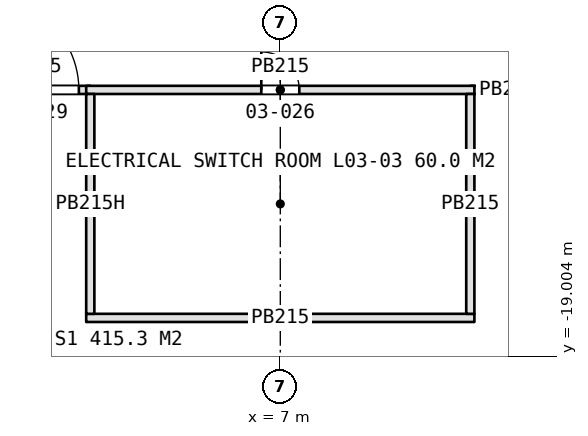
"""IFC4 building model, lengths in metres.
Left out: names, types, materials, properties, quantities, classifications, styles, units other than length and angle.
Written with IfcOpenShell. Run it as: python <this file> out.ifc"""

import sys

from ifc_helpers import new_model, si_unit, direction, frame, frame_2d, origin, place, context, subcontext, project, spatial, rectangle, extrude, element, fill, save


model = new_model("IFC4")
c1 = context("Model", 3, precision=1e-05, world=origin(), true_north=direction((0.0, 1.0)))
c2 = subcontext(c1, "Body", "Model", "MODEL_VIEW")
j1 = project(units=[si_unit("LENGTHUNIT", "METRE"), si_unit("PLANEANGLEUNIT", "RADIAN")], contexts=[c1])
p1 = place(None, origin())
s1 = spatial("IfcSite", under=j1, at=p1, CompositionType="ELEMENT")
p2 = place(p1, origin())
s2 = spatial("IfcBuilding", under=s1, at=p2, CompositionType="ELEMENT")
p3 = place(p2, frame((0.0, 0.0, 15.0)))
s3 = spatial("IfcBuildingStorey", under=s2, at=p3, CompositionType="ELEMENT", Elevation=15.0)
p4 = place(p3, frame((-1.0, -12.0, 0.0), z_axis=(0.0, 0.0, 1.0), x_axis=(1.0, 0.0, 0.0)))
e1 = element("IfcWall", 1, at=p4, inside=s3, PredefinedType="PARTITIONING", context=c2, shape_type="SweptSolid", body=[
    extrude(rectangle(XDim=3.0, YDim=0.215, at=frame_2d((1.5, 0.0))), origin(), (0.0, 0.0, 1.0), 4.2),
])
p5 = place(p4, frame((0.3, 0.0, 0.0)))
e2 = element("IfcOpeningElement", 2, at=p5, cuts=e1, PredefinedType="OPENING", context=c2, shape_type="SweptSolid", body=[
    extrude(rectangle(XDim=2.4, YDim=2.4, at=frame_2d((1.2, 1.2))), frame((0.0, 0.118, 0.0), z_axis=(0.0, -1.0, 0.0), x_axis=(1.0, 0.0, 0.0)), (0.0, 0.0, 1.0), 0.235),
])
p6 = place(p3, frame((12.0, -12.0, 0.0), z_axis=(0.0, 0.0, 1.0), x_axis=(1.0, 0.0, 0.0)))
e3 = element("IfcWall", 3, at=p6, inside=s3, PredefinedType="PARTITIONING", context=c2, shape_type="SweptSolid", body=[
    extrude(rectangle(XDim=2.0, YDim=0.215, at=frame_2d((1.0, 0.0))), origin(), (0.0, 0.0, 1.0), 4.2),
])
p7 = place(p3, frame((1.893, -18.0, 0.0), z_axis=(0.0, 0.0, 1.0), x_axis=(1.0, 0.0, 0.0)))
e4 = element("IfcWall", 4, at=p7, inside=s3, PredefinedType="PARTITIONING", context=c2, shape_type="SweptSolid", body=[
    extrude(rectangle(XDim=10.215, YDim=0.215, at=frame_2d((5.107, 0.0))), origin(), (0.0, 0.0, 1.0), 4.2),
])
p8 = place(p3, frame((1.893, -12.0, 0.0), z_axis=(0.0, 0.0, 1.0), x_axis=(1.0, 0.0, 0.0)))
e5 = element("IfcWall", 5, at=p8, inside=s3, PredefinedType="PARTITIONING", context=c2, shape_type="SweptSolid", body=[
    extrude(rectangle(XDim=10.215, YDim=0.215, at=frame_2d((5.107, 0.0))), origin(), (0.0, 0.0, 1.0), 4.2),
])
p9 = place(p8, frame((4.607, 0.0, 0.0)))
e6 = element("IfcOpeningElement", 6, at=p9, cuts=e5, PredefinedType="OPENING", context=c2, shape_type="SweptSolid", body=[
    extrude(rectangle(XDim=1.0, YDim=2.2, at=frame_2d((0.5, 1.1))), frame((0.0, 0.118, 0.0), z_axis=(0.0, -1.0, 0.0), x_axis=(1.0, 0.0, 0.0)), (0.0, 0.0, 1.0), 0.235),
])
p10 = place(p3, frame((2.0, -17.893, 0.0), z_axis=(0.0, 0.0, 1.0), x_axis=(0.0, 1.0, 0.0)))
e7 = element("IfcWall", 7, at=p10, inside=s3, PredefinedType="PARTITIONING", context=c2, shape_type="SweptSolid", body=[
    extrude(rectangle(XDim=5.785, YDim=0.215, at=frame_2d((2.893, 0.0))), origin(), (0.0, 0.0, 1.0), 3.873),
])
p11 = place(p3, frame((12.0, -17.893, 0.0), z_axis=(0.0, 0.0, 1.0), x_axis=(0.0, 1.0, 0.0)))
e8 = element("IfcWall", 8, at=p11, inside=s3, PredefinedType="PARTITIONING", context=c2, shape_type="SweptSolid", body=[
    extrude(rectangle(XDim=5.785, YDim=0.215, at=frame_2d((2.893, 0.0))), origin(), (0.0, 0.0, 1.0), 4.2),
])
p12 = place(p9, origin())
e9 = element("IfcDoor", 9, at=p12, inside=s3, OperationType="SINGLE_SWING_LEFT", PredefinedType="DOOR", context=c2, shape_type="SweptSolid", body=[
    extrude(rectangle(XDim=1.0, YDim=2.2, at=frame_2d((0.5, 1.1))), frame((0.0, 0.025, 0.0), z_axis=(0.0, -1.0, 0.0), x_axis=(1.0, 0.0, 0.0)), (0.0, 0.0, 1.0), 0.05),
])
fill(e6, e9)
p13 = place(p5, origin())
e10 = element("IfcDoor", 10, at=p13, inside=s3, OperationType="DOUBLE_DOOR_SINGLE_SWING", PredefinedType="DOOR", context=c2, shape_type="SweptSolid", body=[
    extrude(rectangle(XDim=2.4, YDim=2.4, at=frame_2d((1.2, 1.2))), frame((0.0, 0.025, 0.0), z_axis=(0.0, -1.0, 0.0), x_axis=(1.0, 0.0, 0.0)), (0.0, 0.0, 1.0), 0.05),
])
fill(e2, e10)
save(model, sys.argv[1])
